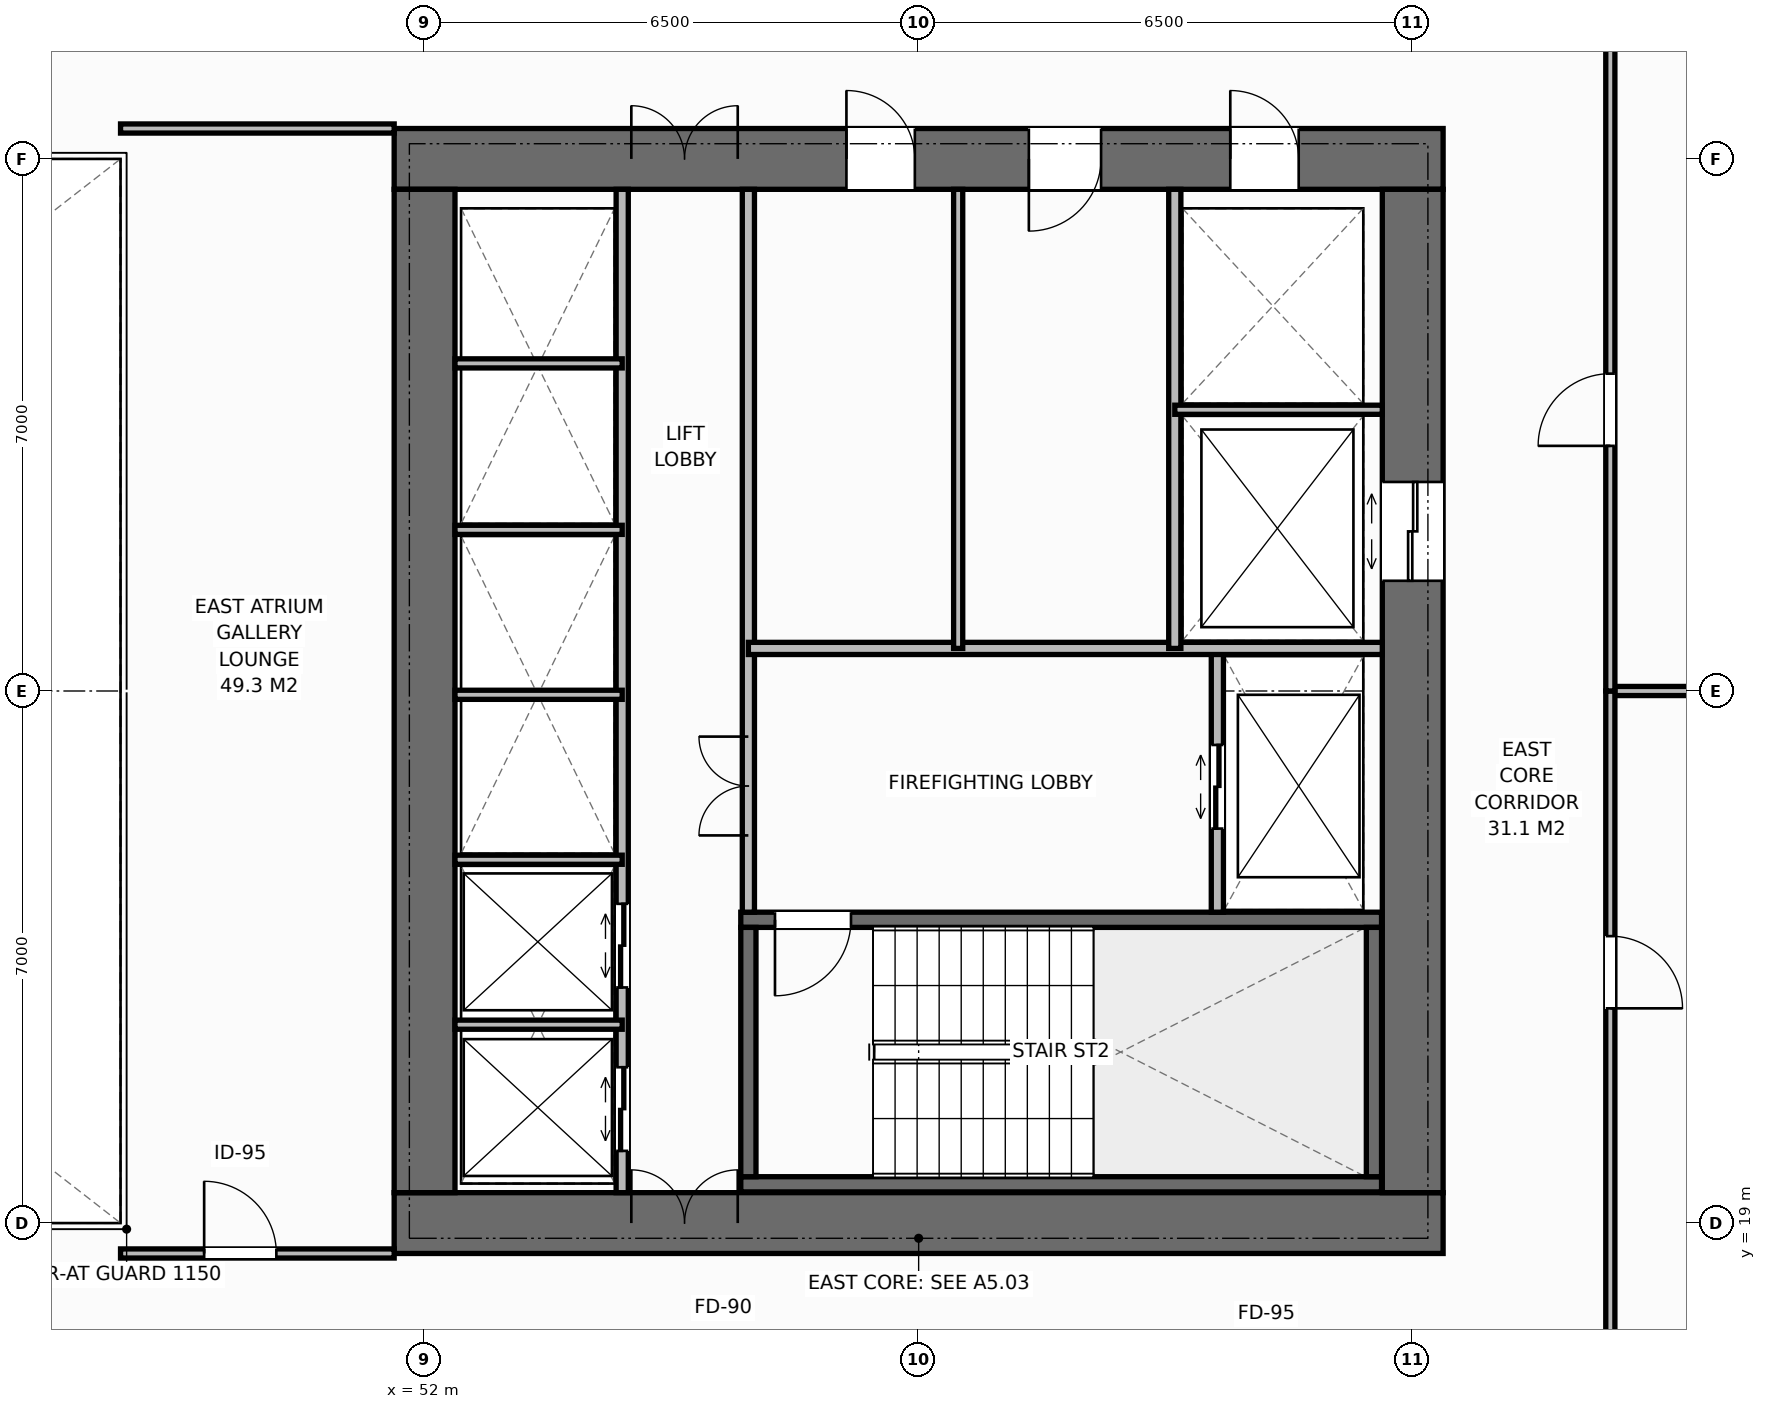
"""IFC4 building model, lengths in metres.
Left out: names, types, materials, properties, quantities, classifications, styles, units other than length and angle.
Written with IfcOpenShell. Run it as: python <this file> out.ifc"""

import sys

from ifc_helpers import new_model, si_unit, direction, frame, frame_2d, origin, place, context, subcontext, project, spatial, rectangle, extrude, element, fill, save


model = new_model("IFC4")
c1 = context("Model", 3, precision=1e-05, world=origin(), true_north=direction((0.0, 1.0)))
c2 = subcontext(c1, "Body", "Model", "MODEL_VIEW")
j1 = project(units=[si_unit("LENGTHUNIT", "METRE"), si_unit("PLANEANGLEUNIT", "RADIAN")], contexts=[c1])
p1 = place(None, origin())
s1 = spatial("IfcSite", under=j1, at=p1, CompositionType="ELEMENT")
p2 = place(p1, origin())
s2 = spatial("IfcBuilding", under=s1, at=p2, CompositionType="ELEMENT")
p3 = place(p2, frame((0.0, 0.0, 62.0)))
s3 = spatial("IfcBuildingStorey", under=s2, at=p3, CompositionType="ELEMENT", Elevation=62.0)
p4 = place(p3, frame((51.6, 19.0, 0.0), z_axis=(0.0, 0.0, 1.0), x_axis=(1.0, 0.0, 0.0)))
e1 = element("IfcWall", 1, at=p4, inside=s3, PredefinedType="SHEAR", context=c2, shape_type="SweptSolid", body=[
    extrude(rectangle(XDim=13.8, YDim=0.8, at=frame_2d((6.9, 0.0))), origin(), (0.0, 0.0, 1.0), 3.8),
])
p5 = place(p4, frame((3.12, 0.0, 0.0)))
e2 = element("IfcOpeningElement", 2, at=p5, cuts=e1, PredefinedType="OPENING", context=c2, shape_type="SweptSolid", body=[
    extrude(rectangle(XDim=1.4, YDim=2.2, at=frame_2d((0.7, 1.1))), frame((0.0, 0.41, 0.0), z_axis=(0.0, -1.0, 0.0), x_axis=(1.0, 0.0, 0.0)), (0.0, 0.0, 1.0), 0.82),
])
p6 = place(p3, frame((51.6, 33.0, 0.0), z_axis=(0.0, 0.0, 1.0), x_axis=(1.0, 0.0, 0.0)))
e3 = element("IfcWall", 3, at=p6, inside=s3, PredefinedType="SHEAR", context=c2, shape_type="SweptSolid", body=[
    extrude(rectangle(XDim=13.8, YDim=0.8, at=frame_2d((6.9, 0.0))), origin(), (0.0, 0.0, 1.0), 3.8),
])
p7 = place(p6, frame((3.12, 0.0, 0.0)))
e4 = element("IfcOpeningElement", 4, at=p7, cuts=e3, PredefinedType="OPENING", context=c2, shape_type="SweptSolid", body=[
    extrude(rectangle(XDim=1.4, YDim=2.2, at=frame_2d((0.7, 1.1))), frame((0.0, 0.41, 0.0), z_axis=(0.0, -1.0, 0.0), x_axis=(1.0, 0.0, 0.0)), (0.0, 0.0, 1.0), 0.82),
])
p8 = place(p6, frame((11.0, 0.0, 0.0)))
e5 = element("IfcOpeningElement", 5, at=p8, cuts=e3, PredefinedType="OPENING", context=c2, shape_type="SweptSolid", body=[
    extrude(rectangle(XDim=0.9, YDim=2.15, at=frame_2d((0.45, 1.075))), frame((0.0, 0.41, 0.0), z_axis=(0.0, -1.0, 0.0), x_axis=(1.0, 0.0, 0.0)), (0.0, 0.0, 1.0), 0.82),
])
p9 = place(p6, frame((5.95, 0.0, 0.0)))
e6 = element("IfcOpeningElement", 6, at=p9, cuts=e3, PredefinedType="OPENING", context=c2, shape_type="SweptSolid", body=[
    extrude(rectangle(XDim=0.9, YDim=2.15, at=frame_2d((0.45, 1.075))), frame((0.0, 0.41, 0.0), z_axis=(0.0, -1.0, 0.0), x_axis=(1.0, 0.0, 0.0)), (0.0, 0.0, 1.0), 0.82),
])
p10 = place(p6, frame((8.35, 0.0, 0.0)))
e7 = element("IfcOpeningElement", 7, at=p10, cuts=e3, PredefinedType="OPENING", context=c2, shape_type="SweptSolid", body=[
    extrude(rectangle(XDim=0.95, YDim=2.15, at=frame_2d((0.475, 1.075))), frame((0.0, 0.41, 0.0), z_axis=(0.0, -1.0, 0.0), x_axis=(1.0, 0.0, 0.0)), (0.0, 0.0, 1.0), 0.82),
])
p11 = place(p3, frame((52.0, 19.4, 0.0), z_axis=(0.0, 0.0, 1.0), x_axis=(0.0, 1.0, 0.0)))
e8 = element("IfcWall", 8, at=p11, inside=s3, PredefinedType="SHEAR", context=c2, shape_type="SweptSolid", body=[
    extrude(rectangle(XDim=13.2, YDim=0.8, at=frame_2d((6.6, 0.0))), origin(), (0.0, 0.0, 1.0), 3.8),
])
p12 = place(p3, frame((65.0, 19.4, 0.0), z_axis=(0.0, 0.0, 1.0), x_axis=(0.0, 1.0, 0.0)))
e9 = element("IfcWall", 9, at=p12, inside=s3, PredefinedType="SHEAR", context=c2, shape_type="SweptSolid", body=[
    extrude(rectangle(XDim=13.2, YDim=0.8, at=frame_2d((6.6, 0.0))), origin(), (0.0, 0.0, 1.0), 3.8),
])
p13 = place(p12, frame((8.05, 0.0, 0.0)))
e10 = element("IfcOpeningElement", 10, at=p13, cuts=e9, PredefinedType="OPENING", context=c2, shape_type="SweptSolid", body=[
    extrude(rectangle(XDim=1.3, YDim=2.2, at=frame_2d((0.65, 1.1))), frame((0.0, 0.41, 0.0), z_axis=(0.0, -1.0, 0.0), x_axis=(1.0, 0.0, 0.0)), (0.0, 0.0, 1.0), 0.82),
])
p14 = place(p3, frame((56.16, 19.51, 0.0), z_axis=(0.0, 0.0, 1.0), x_axis=(1.0, 0.0, 0.0)))
e11 = element("IfcWall", 11, at=p14, inside=s3, PredefinedType="SHEAR", context=c2, shape_type="SweptSolid", body=[
    extrude(rectangle(XDim=8.43, YDim=0.2, at=frame_2d((4.215, 0.0))), origin(), (0.0, 0.0, 1.0), 3.8),
])
p15 = place(p3, frame((56.16, 22.99, 0.0), z_axis=(0.0, 0.0, 1.0), x_axis=(1.0, 0.0, 0.0)))
e12 = element("IfcWall", 12, at=p15, inside=s3, PredefinedType="SHEAR", context=c2, shape_type="SweptSolid", body=[
    extrude(rectangle(XDim=8.43, YDim=0.2, at=frame_2d((4.215, 0.0))), origin(), (0.0, 0.0, 1.0), 3.8),
])
p16 = place(p15, frame((0.45, 0.0, 0.0)))
e13 = element("IfcOpeningElement", 13, at=p16, cuts=e12, PredefinedType="OPENING", context=c2, shape_type="SweptSolid", body=[
    extrude(rectangle(XDim=1.0, YDim=2.15, at=frame_2d((0.5, 1.075))), frame((0.0, 0.11, 0.0), z_axis=(0.0, -1.0, 0.0), x_axis=(1.0, 0.0, 0.0)), (0.0, 0.0, 1.0), 0.22),
])
for number, where, z_axis, x_axis in (
    (14, (56.26, 19.61, 0.0), (0.0, 0.0, 1.0), (0.0, 1.0, 0.0)),
    (15, (64.49, 19.61, 0.0), (0.0, 0.0, 1.0), (0.0, 1.0, 0.0)),
):
    element("IfcWall", number, at=place(p3, frame(where, z_axis=z_axis, x_axis=x_axis)), inside=s3, PredefinedType="SHEAR", context=c2, shape_type="SweptSolid", body=[
        extrude(rectangle(XDim=3.28, YDim=0.2, at=frame_2d((1.64, 0.0))), origin(), (0.0, 0.0, 1.0), 3.8),
    ])
p17 = place(p3, frame((54.6, 19.4, 0.0), z_axis=(0.0, 0.0, 1.0), x_axis=(0.0, 1.0, 0.0)))
e16 = element("IfcWall", 16, at=p17, inside=s3, PredefinedType="STANDARD", context=c2, shape_type="SweptSolid", body=[
    extrude(rectangle(XDim=13.2, YDim=0.16, at=frame_2d((6.6, 0.0))), origin(), (0.0, 0.0, 1.0), 3.55),
])
p18 = place(p17, frame((0.55, 0.0, 0.0)))
e17 = element("IfcOpeningElement", 17, at=p18, cuts=e16, PredefinedType="OPENING", context=c2, shape_type="SweptSolid", body=[
    extrude(rectangle(XDim=1.1, YDim=2.2, at=frame_2d((0.55, 1.1))), frame((0.0, 0.09, 0.0), z_axis=(0.0, -1.0, 0.0), x_axis=(1.0, 0.0, 0.0)), (0.0, 0.0, 1.0), 0.18),
])
p19 = place(p17, frame((2.7, 0.0, 0.0)))
e18 = element("IfcOpeningElement", 18, at=p19, cuts=e16, PredefinedType="OPENING", context=c2, shape_type="SweptSolid", body=[
    extrude(rectangle(XDim=1.1, YDim=2.2, at=frame_2d((0.55, 1.1))), frame((0.0, 0.09, 0.0), z_axis=(0.0, -1.0, 0.0), x_axis=(1.0, 0.0, 0.0)), (0.0, 0.0, 1.0), 0.18),
])
p20 = place(p3, frame((56.26, 23.09, 0.0), z_axis=(0.0, 0.0, 1.0), x_axis=(0.0, 1.0, 0.0)))
e19 = element("IfcWall", 19, at=p20, inside=s3, PredefinedType="STANDARD", context=c2, shape_type="SweptSolid", body=[
    extrude(rectangle(XDim=9.51, YDim=0.16, at=frame_2d((4.755, 0.0))), origin(), (0.0, 0.0, 1.0), 3.55),
])
p21 = place(p20, frame((1.01, 0.0, 0.0)))
e20 = element("IfcOpeningElement", 20, at=p21, cuts=e19, PredefinedType="OPENING", context=c2, shape_type="SweptSolid", body=[
    extrude(rectangle(XDim=1.3, YDim=2.2, at=frame_2d((0.65, 1.1))), frame((0.0, 0.09, 0.0), z_axis=(0.0, -1.0, 0.0), x_axis=(1.0, 0.0, 0.0)), (0.0, 0.0, 1.0), 0.18),
])
for number, where, z_axis, x_axis in (
    (21, (52.4, 21.61, 0.0), (0.0, 0.0, 1.0), (1.0, 0.0, 0.0)),
    (22, (52.4, 23.78, 0.0), (0.0, 0.0, 1.0), (1.0, 0.0, 0.0)),
    (23, (52.4, 25.95, 0.0), (0.0, 0.0, 1.0), (1.0, 0.0, 0.0)),
    (24, (52.4, 28.12, 0.0), (0.0, 0.0, 1.0), (1.0, 0.0, 0.0)),
    (25, (52.4, 30.31, 0.0), (0.0, 0.0, 1.0), (1.0, 0.0, 0.0)),
):
    element("IfcWall", number, at=place(p3, frame(where, z_axis=z_axis, x_axis=x_axis)), inside=s3, PredefinedType="PARTITIONING", context=c2, shape_type="SweptSolid", body=[
        extrude(rectangle(XDim=2.2, YDim=0.12, at=frame_2d((1.1, 0.0))), origin(), (0.0, 0.0, 1.0), 3.55),
    ])
p22 = place(p3, frame((62.43, 23.09, 0.0), z_axis=(0.0, 0.0, 1.0), x_axis=(0.0, 1.0, 0.0)))
e26 = element("IfcWall", 26, at=p22, inside=s3, PredefinedType="STANDARD", context=c2, shape_type="SweptSolid", body=[
    extrude(rectangle(XDim=3.47, YDim=0.16, at=frame_2d((1.735, 0.0))), origin(), (0.0, 0.0, 1.0), 3.55),
])
p23 = place(p22, frame((1.1, 0.0, 0.0)))
e27 = element("IfcOpeningElement", 27, at=p23, cuts=e26, PredefinedType="OPENING", context=c2, shape_type="SweptSolid", body=[
    extrude(rectangle(XDim=1.1, YDim=2.2, at=frame_2d((0.55, 1.1))), frame((0.0, 0.09, 0.0), z_axis=(0.0, -1.0, 0.0), x_axis=(1.0, 0.0, 0.0)), (0.0, 0.0, 1.0), 0.18),
])
p24 = place(p3, frame((56.26, 26.56, 0.0), z_axis=(0.0, 0.0, 1.0), x_axis=(1.0, 0.0, 0.0)))
e28 = element("IfcWall", 28, at=p24, inside=s3, PredefinedType="STANDARD", context=c2, shape_type="SweptSolid", body=[
    extrude(rectangle(XDim=8.34, YDim=0.16, at=frame_2d((4.17, 0.0))), origin(), (0.0, 0.0, 1.0), 3.55),
])
p25 = place(p3, frame((61.87, 26.56, 0.0), z_axis=(0.0, 0.0, 1.0), x_axis=(0.0, 1.0, 0.0)))
e29 = element("IfcWall", 29, at=p25, inside=s3, PredefinedType="STANDARD", context=c2, shape_type="SweptSolid", body=[
    extrude(rectangle(XDim=6.04, YDim=0.16, at=frame_2d((3.02, 0.0))), origin(), (0.0, 0.0, 1.0), 3.55),
])
p26 = place(p3, frame((61.87, 29.7, 0.0), z_axis=(0.0, 0.0, 1.0), x_axis=(1.0, 0.0, 0.0)))
e30 = element("IfcWall", 30, at=p26, inside=s3, PredefinedType="PARTITIONING", context=c2, shape_type="SweptSolid", body=[
    extrude(rectangle(XDim=2.73, YDim=0.12, at=frame_2d((1.365, 0.0))), origin(), (0.0, 0.0, 1.0), 3.55),
])
p27 = place(p3, frame((59.02, 26.56, 0.0), z_axis=(0.0, 0.0, 1.0), x_axis=(0.0, 1.0, 0.0)))
e31 = element("IfcWall", 31, at=p27, inside=s3, PredefinedType="PARTITIONING", context=c2, shape_type="SweptSolid", body=[
    extrude(rectangle(XDim=6.04, YDim=0.12, at=frame_2d((3.02, 0.0))), origin(), (0.0, 0.0, 1.0), 3.55),
])
p28 = place(p3, frame((48.0, 33.4, 0.0), z_axis=(0.0, 0.0, 1.0), x_axis=(1.0, 0.0, 0.0)))
e32 = element("IfcWall", 32, at=p28, inside=s3, PredefinedType="PARTITIONING", context=c2, shape_type="SweptSolid", body=[
    extrude(rectangle(XDim=3.6, YDim=0.12, at=frame_2d((1.8, 0.0))), origin(), (0.0, 0.0, 1.0), 3.55),
])
p29 = place(p3, frame((48.0, 18.6, 0.0), z_axis=(0.0, 0.0, 1.0), x_axis=(1.0, 0.0, 0.0)))
e33 = element("IfcWall", 33, at=p29, inside=s3, PredefinedType="PARTITIONING", context=c2, shape_type="SweptSolid", body=[
    extrude(rectangle(XDim=3.6, YDim=0.12, at=frame_2d((1.8, 0.0))), origin(), (0.0, 0.0, 1.0), 3.55),
])
p30 = place(p29, frame((1.1, 0.0, 0.0)))
e34 = element("IfcOpeningElement", 34, at=p30, cuts=e33, PredefinedType="OPENING", context=c2, shape_type="SweptSolid", body=[
    extrude(rectangle(XDim=0.95, YDim=2.15, at=frame_2d((0.475, 1.075))), frame((0.0, 0.07, 0.0), z_axis=(0.0, -1.0, 0.0), x_axis=(1.0, 0.0, 0.0)), (0.0, 0.0, 1.0), 0.14),
])
p31 = place(p3, frame((67.6, 26.0, 0.0), z_axis=(0.0, 0.0, 1.0), x_axis=(1.0, 0.0, 0.0)))
e35 = element("IfcWall", 35, at=p31, inside=s3, PredefinedType="PARTITIONING", context=c2, shape_type="SweptSolid", body=[
    extrude(rectangle(XDim=10.58, YDim=0.12, at=frame_2d((5.29, 0.0))), origin(), (0.0, 0.0, 1.0), 3.55),
])
p32 = place(p3, frame((67.6, 16.5, 0.0), z_axis=(0.0, 0.0, 1.0), x_axis=(0.0, 1.0, 0.0)))
e36 = element("IfcWall", 36, at=p32, inside=s3, PredefinedType="PARTITIONING", context=c2, shape_type="SweptSolid", body=[
    extrude(rectangle(XDim=9.5, YDim=0.12, at=frame_2d((4.75, 0.0))), origin(), (0.0, 0.0, 1.0), 3.55),
])
p33 = place(p32, frame((5.325, 0.0, 0.0)))
e37 = element("IfcOpeningElement", 37, at=p33, cuts=e36, PredefinedType="OPENING", context=c2, shape_type="SweptSolid", body=[
    extrude(rectangle(XDim=0.95, YDim=2.15, at=frame_2d((0.475, 1.075))), frame((0.0, 0.07, 0.0), z_axis=(0.0, -1.0, 0.0), x_axis=(1.0, 0.0, 0.0)), (0.0, 0.0, 1.0), 0.14),
])
p34 = place(p3, frame((67.6, 26.0, 0.0), z_axis=(0.0, 0.0, 1.0), x_axis=(0.0, 1.0, 0.0)))
e38 = element("IfcWall", 38, at=p34, inside=s3, PredefinedType="PARTITIONING", context=c2, shape_type="SweptSolid", body=[
    extrude(rectangle(XDim=9.5, YDim=0.12, at=frame_2d((4.75, 0.0))), origin(), (0.0, 0.0, 1.0), 3.55),
])
p35 = place(p34, frame((3.225, 0.0, 0.0)))
e39 = element("IfcOpeningElement", 39, at=p35, cuts=e38, PredefinedType="OPENING", context=c2, shape_type="SweptSolid", body=[
    extrude(rectangle(XDim=0.95, YDim=2.15, at=frame_2d((0.475, 1.075))), frame((0.0, 0.07, 0.0), z_axis=(0.0, -1.0, 0.0), x_axis=(1.0, 0.0, 0.0)), (0.0, 0.0, 1.0), 0.14),
])
p36 = place(p5, origin())
e40 = element("IfcDoor", 40, at=p36, inside=s3, OperationType="DOUBLE_DOOR_SINGLE_SWING", PredefinedType="DOOR", context=c2, shape_type="SweptSolid", body=[
    extrude(rectangle(XDim=1.4, YDim=2.2, at=frame_2d((0.7, 1.1))), frame((0.0, 0.125, 0.0), z_axis=(0.0, -1.0, 0.0), x_axis=(1.0, 0.0, 0.0)), (0.0, 0.0, 1.0), 0.05),
])
fill(e2, e40)
p37 = place(p7, origin())
e41 = element("IfcDoor", 41, at=p37, inside=s3, OperationType="DOUBLE_DOOR_SINGLE_SWING", PredefinedType="DOOR", context=c2, shape_type="SweptSolid", body=[
    extrude(rectangle(XDim=1.4, YDim=2.2, at=frame_2d((0.7, 1.1))), frame((0.0, -0.075, 0.0), z_axis=(0.0, -1.0, 0.0), x_axis=(1.0, 0.0, 0.0)), (0.0, 0.0, 1.0), 0.05),
])
fill(e4, e41)
p38 = place(p18, origin())
e42 = element("IfcDoor", 42, at=p38, inside=s3, OperationType="DOUBLE_DOOR_SLIDING", PredefinedType="DOOR", context=c2, shape_type="SweptSolid", body=[
    extrude(rectangle(XDim=1.1, YDim=2.2, at=frame_2d((0.55, 1.1))), frame((0.0, 0.025, 0.0), z_axis=(0.0, -1.0, 0.0), x_axis=(1.0, 0.0, 0.0)), (0.0, 0.0, 1.0), 0.05),
])
fill(e17, e42)
p39 = place(p19, origin())
e43 = element("IfcDoor", 43, at=p39, inside=s3, OperationType="DOUBLE_DOOR_SLIDING", PredefinedType="DOOR", context=c2, shape_type="SweptSolid", body=[
    extrude(rectangle(XDim=1.1, YDim=2.2, at=frame_2d((0.55, 1.1))), frame((0.0, 0.025, 0.0), z_axis=(0.0, -1.0, 0.0), x_axis=(1.0, 0.0, 0.0)), (0.0, 0.0, 1.0), 0.05),
])
fill(e18, e43)
p40 = place(p16, origin())
e44 = element("IfcDoor", 44, at=p40, inside=s3, OperationType="SINGLE_SWING_RIGHT", PredefinedType="DOOR", context=c2, shape_type="SweptSolid", body=[
    extrude(rectangle(XDim=1.0, YDim=2.15, at=frame_2d((0.5, 1.075))), frame((0.0, 0.025, 0.0), z_axis=(0.0, -1.0, 0.0), x_axis=(1.0, 0.0, 0.0)), (0.0, 0.0, 1.0), 0.05),
])
fill(e13, e44)
p41 = place(p23, origin())
e45 = element("IfcDoor", 45, at=p41, inside=s3, OperationType="DOUBLE_DOOR_SLIDING", PredefinedType="DOOR", context=c2, shape_type="SweptSolid", body=[
    extrude(rectangle(XDim=1.1, YDim=2.2, at=frame_2d((0.55, 1.1))), frame((0.0, 0.025, 0.0), z_axis=(0.0, -1.0, 0.0), x_axis=(1.0, 0.0, 0.0)), (0.0, 0.0, 1.0), 0.05),
])
fill(e27, e45)
p42 = place(p21, origin())
e46 = element("IfcDoor", 46, at=p42, inside=s3, OperationType="DOUBLE_DOOR_SINGLE_SWING", PredefinedType="DOOR", context=c2, shape_type="SweptSolid", body=[
    extrude(rectangle(XDim=1.3, YDim=2.2, at=frame_2d((0.65, 1.1))), frame((0.0, 0.025, 0.0), z_axis=(0.0, -1.0, 0.0), x_axis=(1.0, 0.0, 0.0)), (0.0, 0.0, 1.0), 0.05),
])
fill(e20, e46)
p43 = place(p13, origin())
e47 = element("IfcDoor", 47, at=p43, inside=s3, OperationType="DOUBLE_DOOR_SLIDING", PredefinedType="DOOR", context=c2, shape_type="SweptSolid", body=[
    extrude(rectangle(XDim=1.3, YDim=2.2, at=frame_2d((0.65, 1.1))), frame((0.0, 0.025, 0.0), z_axis=(0.0, -1.0, 0.0), x_axis=(1.0, 0.0, 0.0)), (0.0, 0.0, 1.0), 0.05),
])
fill(e10, e47)
p44 = place(p8, origin())
e48 = element("IfcDoor", 48, at=p44, inside=s3, OperationType="SINGLE_SWING_LEFT", PredefinedType="DOOR", context=c2, shape_type="SweptSolid", body=[
    extrude(rectangle(XDim=0.9, YDim=2.15, at=frame_2d((0.45, 1.075))), frame((0.0, -0.075, 0.0), z_axis=(0.0, -1.0, 0.0), x_axis=(1.0, 0.0, 0.0)), (0.0, 0.0, 1.0), 0.05),
])
fill(e5, e48)
p45 = place(p9, origin())
e49 = element("IfcDoor", 49, at=p45, inside=s3, OperationType="SINGLE_SWING_LEFT", PredefinedType="DOOR", context=c2, shape_type="SweptSolid", body=[
    extrude(rectangle(XDim=0.9, YDim=2.15, at=frame_2d((0.45, 1.075))), frame((0.0, -0.075, 0.0), z_axis=(0.0, -1.0, 0.0), x_axis=(1.0, 0.0, 0.0)), (0.0, 0.0, 1.0), 0.05),
])
fill(e6, e49)
p46 = place(p10, origin())
e50 = element("IfcDoor", 50, at=p46, inside=s3, OperationType="SINGLE_SWING_RIGHT", PredefinedType="DOOR", context=c2, shape_type="SweptSolid", body=[
    extrude(rectangle(XDim=0.95, YDim=2.15, at=frame_2d((0.475, 1.075))), frame((0.0, -0.075, 0.0), z_axis=(0.0, -1.0, 0.0), x_axis=(1.0, 0.0, 0.0)), (0.0, 0.0, 1.0), 0.05),
])
fill(e7, e50)
p47 = place(p30, origin())
e51 = element("IfcDoor", 51, at=p47, inside=s3, OperationType="SINGLE_SWING_LEFT", PredefinedType="DOOR", context=c2, shape_type="SweptSolid", body=[
    extrude(rectangle(XDim=0.95, YDim=2.15, at=frame_2d((0.475, 1.075))), frame((0.0, 0.025, 0.0), z_axis=(0.0, -1.0, 0.0), x_axis=(1.0, 0.0, 0.0)), (0.0, 0.0, 1.0), 0.05),
])
fill(e34, e51)
p48 = place(p33, origin())
e52 = element("IfcDoor", 52, at=p48, inside=s3, OperationType="SINGLE_SWING_RIGHT", PredefinedType="DOOR", context=c2, shape_type="SweptSolid", body=[
    extrude(rectangle(XDim=0.95, YDim=2.15, at=frame_2d((0.475, 1.075))), frame((0.0, 0.025, 0.0), z_axis=(0.0, -1.0, 0.0), x_axis=(1.0, 0.0, 0.0)), (0.0, 0.0, 1.0), 0.05),
])
fill(e37, e52)
p49 = place(p35, origin())
e53 = element("IfcDoor", 53, at=p49, inside=s3, OperationType="SINGLE_SWING_LEFT", PredefinedType="DOOR", context=c2, shape_type="SweptSolid", body=[
    extrude(rectangle(XDim=0.95, YDim=2.15, at=frame_2d((0.475, 1.075))), frame((0.0, 0.025, 0.0), z_axis=(0.0, -1.0, 0.0), x_axis=(1.0, 0.0, 0.0)), (0.0, 0.0, 1.0), 0.05),
])
fill(e39, e53)
save(model, sys.argv[1])
